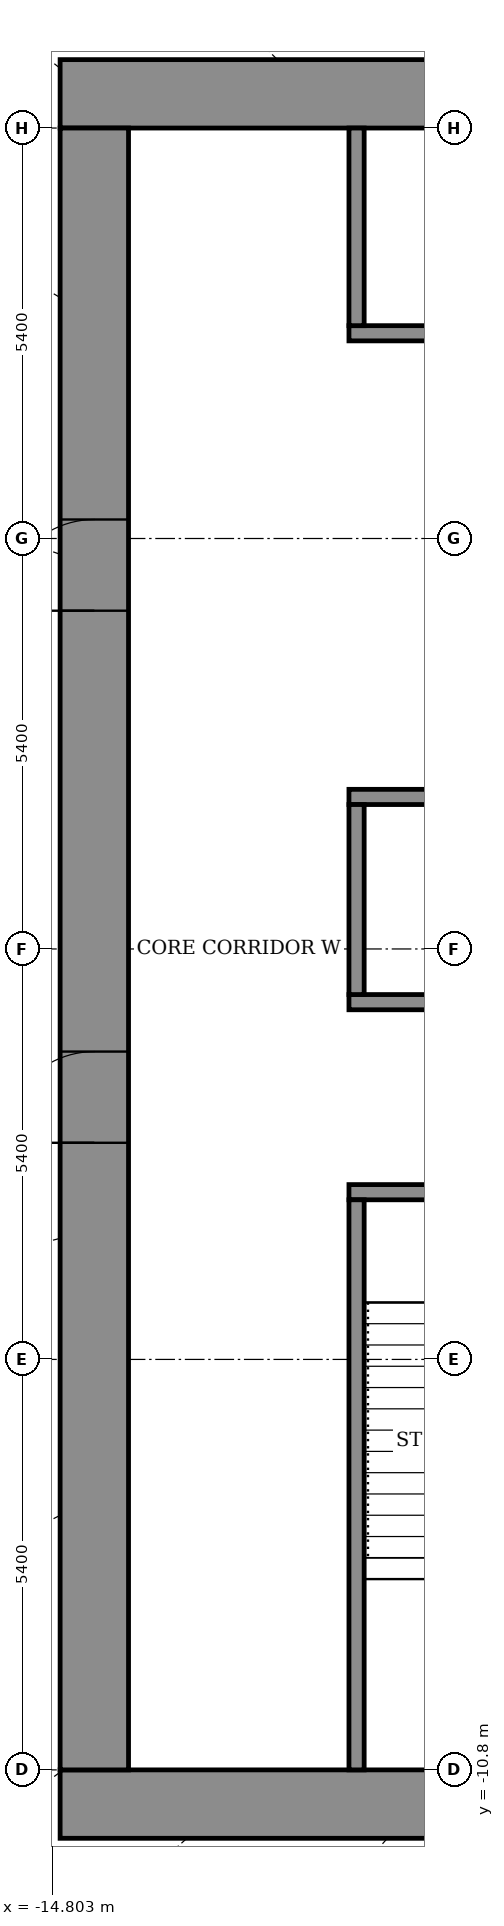
"""IFC4 building model, lengths in metres.
Left out: names, types, materials, properties, quantities, classifications, styles, units other than length and angle.
Written with IfcOpenShell. Run it as: python <this file> out.ifc"""

import sys

from ifc_helpers import new_model, si_unit, direction, frame, frame_2d, origin, place, context, subcontext, project, spatial, rectangle, extrude, element, fill, save


model = new_model("IFC4")
c1 = context("Model", 3, precision=1e-05, world=origin(), true_north=direction((0.0, 1.0)))
c2 = subcontext(c1, "Body", "Model", "MODEL_VIEW")
j1 = project(units=[si_unit("LENGTHUNIT", "METRE"), si_unit("PLANEANGLEUNIT", "RADIAN")], contexts=[c1])
p1 = place(None, origin())
s1 = spatial("IfcSite", under=j1, at=p1, CompositionType="ELEMENT")
p2 = place(p1, origin())
s2 = spatial("IfcBuilding", under=s1, at=p2, CompositionType="ELEMENT")
p3 = place(p2, frame((0.0, 0.0, 170.7)))
s3 = spatial("IfcBuildingStorey", under=s2, at=p3, CompositionType="ELEMENT", Elevation=170.7)
for number, where, z_axis, x_axis in (
    (1, (-14.7, -11.25, 0.0), (0.0, 0.0, 1.0), (1.0, 0.0, 0.0)),
    (2, (-14.7, 11.25, 0.0), (0.0, 0.0, 1.0), (1.0, 0.0, 0.0)),
):
    element("IfcWall", number, at=place(p3, frame(where, z_axis=z_axis, x_axis=x_axis)), inside=s3, PredefinedType="SHEAR", context=c2, shape_type="SweptSolid", body=[
        extrude(rectangle(XDim=29.4, YDim=0.9, at=frame_2d((14.7, 0.0))), origin(), (0.0, 0.0, 1.0), 4.6),
    ])
p4 = place(p3, frame((-14.25, -10.8, 0.0), z_axis=(0.0, 0.0, 1.0), x_axis=(0.0, 1.0, 0.0)))
e3 = element("IfcWall", 3, at=p4, inside=s3, PredefinedType="SHEAR", context=c2, shape_type="SweptSolid", body=[
    extrude(rectangle(XDim=21.6, YDim=0.9, at=frame_2d((10.8, 0.0))), origin(), (0.0, 0.0, 1.0), 4.6),
])
p5 = place(p4, frame((8.25, 0.0, 0.0)))
e4 = element("IfcOpeningElement", 4, at=p5, cuts=e3, PredefinedType="OPENING", context=c2, shape_type="SweptSolid", body=[
    extrude(rectangle(XDim=1.2, YDim=2.1, at=frame_2d((0.6, 1.05))), frame((0.0, 0.46, 0.0), z_axis=(0.0, -1.0, 0.0), x_axis=(1.0, 0.0, 0.0)), (0.0, 0.0, 1.0), 0.92),
])
p6 = place(p4, frame((15.25, 0.0, 0.0)))
e5 = element("IfcOpeningElement", 5, at=p6, cuts=e3, PredefinedType="OPENING", context=c2, shape_type="SweptSolid", body=[
    extrude(rectangle(XDim=1.2, YDim=2.1, at=frame_2d((0.6, 1.05))), frame((0.0, 0.46, 0.0), z_axis=(0.0, -1.0, 0.0), x_axis=(1.0, 0.0, 0.0)), (0.0, 0.0, 1.0), 0.92),
])
p7 = place(p3, frame((-10.9, -3.2, 0.0), z_axis=(0.0, 0.0, 1.0), x_axis=(1.0, 0.0, 0.0)))
e6 = element("IfcWall", 6, at=p7, inside=s3, PredefinedType="SHEAR", context=c2, shape_type="SweptSolid", body=[
    extrude(rectangle(XDim=21.8, YDim=0.2, at=frame_2d((10.9, 0.0))), origin(), (0.0, 0.0, 1.0), 4.05),
])
p8 = place(p7, frame((1.075, 0.0, 0.0)))
e7 = element("IfcOpeningElement", 7, at=p8, cuts=e6, PredefinedType="OPENING", context=c2, shape_type="SweptSolid", body=[
    extrude(rectangle(XDim=1.1, YDim=2.1, at=frame_2d((0.55, 1.05))), frame((0.0, 0.11, 0.0), z_axis=(0.0, -1.0, 0.0), x_axis=(1.0, 0.0, 0.0)), (0.0, 0.0, 1.0), 0.22),
])
p9 = place(p7, frame((10.325, 0.0, 0.0)))
e8 = element("IfcOpeningElement", 8, at=p9, cuts=e6, PredefinedType="OPENING", context=c2, shape_type="SweptSolid", body=[
    extrude(rectangle(XDim=1.1, YDim=2.1, at=frame_2d((0.55, 1.05))), frame((0.0, 0.11, 0.0), z_axis=(0.0, -1.0, 0.0), x_axis=(1.0, 0.0, 0.0)), (0.0, 0.0, 1.0), 0.22),
])
p10 = place(p7, frame((19.625, 0.0, 0.0)))
e9 = element("IfcOpeningElement", 9, at=p10, cuts=e6, PredefinedType="OPENING", context=c2, shape_type="SweptSolid", body=[
    extrude(rectangle(XDim=1.1, YDim=2.1, at=frame_2d((0.55, 1.05))), frame((0.0, 0.11, 0.0), z_axis=(0.0, -1.0, 0.0), x_axis=(1.0, 0.0, 0.0)), (0.0, 0.0, 1.0), 0.22),
])
p11 = place(p7, frame((5.7, 0.0, 0.0)))
e10 = element("IfcOpeningElement", 10, at=p11, cuts=e6, PredefinedType="OPENING", context=c2, shape_type="SweptSolid", body=[
    extrude(rectangle(XDim=1.1, YDim=2.1, at=frame_2d((0.55, 1.05))), frame((0.0, 0.11, 0.0), z_axis=(0.0, -1.0, 0.0), x_axis=(1.0, 0.0, 0.0)), (0.0, 0.0, 1.0), 0.22),
])
p12 = place(p7, frame((14.975, 0.0, 0.0)))
e11 = element("IfcOpeningElement", 11, at=p12, cuts=e6, PredefinedType="OPENING", context=c2, shape_type="SweptSolid", body=[
    extrude(rectangle(XDim=1.1, YDim=2.1, at=frame_2d((0.55, 1.05))), frame((0.0, 0.11, 0.0), z_axis=(0.0, -1.0, 0.0), x_axis=(1.0, 0.0, 0.0)), (0.0, 0.0, 1.0), 0.22),
])
p13 = place(p3, frame((-10.9, -0.7, 0.0), z_axis=(0.0, 0.0, 1.0), x_axis=(1.0, 0.0, 0.0)))
e12 = element("IfcWall", 12, at=p13, inside=s3, PredefinedType="SHEAR", context=c2, shape_type="SweptSolid", body=[
    extrude(rectangle(XDim=21.8, YDim=0.2, at=frame_2d((10.9, 0.0))), origin(), (0.0, 0.0, 1.0), 4.05),
])
p14 = place(p3, frame((-10.9, 2.0, 0.0), z_axis=(0.0, 0.0, 1.0), x_axis=(1.0, 0.0, 0.0)))
e13 = element("IfcWall", 13, at=p14, inside=s3, PredefinedType="SHEAR", context=c2, shape_type="SweptSolid", body=[
    extrude(rectangle(XDim=21.8, YDim=0.2, at=frame_2d((10.9, 0.0))), origin(), (0.0, 0.0, 1.0), 4.05),
])
p15 = place(p14, frame((14.4, 0.0, 0.0)))
e14 = element("IfcOpeningElement", 14, at=p15, cuts=e13, PredefinedType="OPENING", context=c2, shape_type="SweptSolid", body=[
    extrude(rectangle(XDim=1.1, YDim=2.1, at=frame_2d((0.55, 1.05))), frame((0.0, 0.11, 0.0), z_axis=(0.0, -1.0, 0.0), x_axis=(1.0, 0.0, 0.0)), (0.0, 0.0, 1.0), 0.22),
])
p16 = place(p14, frame((17.1, 0.0, 0.0)))
e15 = element("IfcOpeningElement", 15, at=p16, cuts=e13, PredefinedType="OPENING", context=c2, shape_type="SweptSolid", body=[
    extrude(rectangle(XDim=1.1, YDim=2.1, at=frame_2d((0.55, 1.05))), frame((0.0, 0.11, 0.0), z_axis=(0.0, -1.0, 0.0), x_axis=(1.0, 0.0, 0.0)), (0.0, 0.0, 1.0), 0.22),
])
p17 = place(p14, frame((19.8, 0.0, 0.0)))
e16 = element("IfcOpeningElement", 16, at=p17, cuts=e13, PredefinedType="OPENING", context=c2, shape_type="SweptSolid", body=[
    extrude(rectangle(XDim=1.1, YDim=2.1, at=frame_2d((0.55, 1.05))), frame((0.0, 0.11, 0.0), z_axis=(0.0, -1.0, 0.0), x_axis=(1.0, 0.0, 0.0)), (0.0, 0.0, 1.0), 0.22),
])
p18 = place(p14, frame((1.675, 0.0, 0.0)))
e17 = element("IfcOpeningElement", 17, at=p18, cuts=e13, PredefinedType="OPENING", context=c2, shape_type="SweptSolid", body=[
    extrude(rectangle(XDim=0.9, YDim=2.1, at=frame_2d((0.45, 1.05))), frame((0.0, 0.11, 0.0), z_axis=(0.0, -1.0, 0.0), x_axis=(1.0, 0.0, 0.0)), (0.0, 0.0, 1.0), 0.22),
])
p19 = place(p14, frame((8.425, 0.0, 0.0)))
e18 = element("IfcOpeningElement", 18, at=p19, cuts=e13, PredefinedType="OPENING", context=c2, shape_type="SweptSolid", body=[
    extrude(rectangle(XDim=0.9, YDim=2.1, at=frame_2d((0.45, 1.05))), frame((0.0, 0.11, 0.0), z_axis=(0.0, -1.0, 0.0), x_axis=(1.0, 0.0, 0.0)), (0.0, 0.0, 1.0), 0.22),
])
p20 = place(p3, frame((-10.9, 8.1, 0.0), z_axis=(0.0, 0.0, 1.0), x_axis=(1.0, 0.0, 0.0)))
e19 = element("IfcWall", 19, at=p20, inside=s3, PredefinedType="SHEAR", context=c2, shape_type="SweptSolid", body=[
    extrude(rectangle(XDim=21.8, YDim=0.2, at=frame_2d((10.9, 0.0))), origin(), (0.0, 0.0, 1.0), 4.05),
])
p21 = place(p20, frame((14.4, 0.0, 0.0)))
e20 = element("IfcOpeningElement", 20, at=p21, cuts=e19, PredefinedType="OPENING", context=c2, shape_type="SweptSolid", body=[
    extrude(rectangle(XDim=1.1, YDim=2.1, at=frame_2d((0.55, 1.05))), frame((0.0, 0.11, 0.0), z_axis=(0.0, -1.0, 0.0), x_axis=(1.0, 0.0, 0.0)), (0.0, 0.0, 1.0), 0.22),
])
p22 = place(p20, frame((17.1, 0.0, 0.0)))
e21 = element("IfcOpeningElement", 21, at=p22, cuts=e19, PredefinedType="OPENING", context=c2, shape_type="SweptSolid", body=[
    extrude(rectangle(XDim=1.1, YDim=2.1, at=frame_2d((0.55, 1.05))), frame((0.0, 0.11, 0.0), z_axis=(0.0, -1.0, 0.0), x_axis=(1.0, 0.0, 0.0)), (0.0, 0.0, 1.0), 0.22),
])
p23 = place(p20, frame((19.8, 0.0, 0.0)))
e22 = element("IfcOpeningElement", 22, at=p23, cuts=e19, PredefinedType="OPENING", context=c2, shape_type="SweptSolid", body=[
    extrude(rectangle(XDim=1.1, YDim=2.1, at=frame_2d((0.55, 1.05))), frame((0.0, 0.11, 0.0), z_axis=(0.0, -1.0, 0.0), x_axis=(1.0, 0.0, 0.0)), (0.0, 0.0, 1.0), 0.22),
])
p24 = place(p20, frame((1.675, 0.0, 0.0)))
e23 = element("IfcOpeningElement", 23, at=p24, cuts=e19, PredefinedType="OPENING", context=c2, shape_type="SweptSolid", body=[
    extrude(rectangle(XDim=0.9, YDim=2.1, at=frame_2d((0.45, 1.05))), frame((0.0, 0.11, 0.0), z_axis=(0.0, -1.0, 0.0), x_axis=(1.0, 0.0, 0.0)), (0.0, 0.0, 1.0), 0.22),
])
p25 = place(p20, frame((8.425, 0.0, 0.0)))
e24 = element("IfcOpeningElement", 24, at=p25, cuts=e19, PredefinedType="OPENING", context=c2, shape_type="SweptSolid", body=[
    extrude(rectangle(XDim=0.9, YDim=2.1, at=frame_2d((0.45, 1.05))), frame((0.0, 0.11, 0.0), z_axis=(0.0, -1.0, 0.0), x_axis=(1.0, 0.0, 0.0)), (0.0, 0.0, 1.0), 0.22),
])
p26 = place(p3, frame((-10.8, -10.8, 0.0), z_axis=(0.0, 0.0, 1.0), x_axis=(0.0, 1.0, 0.0)))
e25 = element("IfcWall", 25, at=p26, inside=s3, PredefinedType="SHEAR", context=c2, shape_type="SweptSolid", body=[
    extrude(rectangle(XDim=7.5, YDim=0.2, at=frame_2d((3.75, 0.0))), origin(), (0.0, 0.0, 1.0), 4.05),
])
p27 = place(p3, frame((-10.8, -0.6, 0.0), z_axis=(0.0, 0.0, 1.0), x_axis=(0.0, 1.0, 0.0)))
e26 = element("IfcWall", 26, at=p27, inside=s3, PredefinedType="STANDARD", context=c2, shape_type="SweptSolid", body=[
    extrude(rectangle(XDim=2.5, YDim=0.2, at=frame_2d((1.25, 0.0))), origin(), (0.0, 0.0, 1.0), 4.05),
])
p28 = place(p3, frame((-10.8, 8.2, 0.0), z_axis=(0.0, 0.0, 1.0), x_axis=(0.0, 1.0, 0.0)))
e27 = element("IfcWall", 27, at=p28, inside=s3, PredefinedType="STANDARD", context=c2, shape_type="SweptSolid", body=[
    extrude(rectangle(XDim=2.6, YDim=0.2, at=frame_2d((1.3, 0.0))), origin(), (0.0, 0.0, 1.0), 4.05),
])
p29 = place(p5, origin())
e28 = element("IfcDoor", 28, at=p29, inside=s3, OperationType="DOUBLE_DOOR_SINGLE_SWING", PredefinedType="DOOR", context=c2, shape_type="SweptSolid", body=[
    extrude(rectangle(XDim=1.2, YDim=2.1, at=frame_2d((0.6, 1.05))), frame((0.0, 0.025, 0.0), z_axis=(0.0, -1.0, 0.0), x_axis=(1.0, 0.0, 0.0)), (0.0, 0.0, 1.0), 0.05),
])
fill(e4, e28)
p30 = place(p6, origin())
e29 = element("IfcDoor", 29, at=p30, inside=s3, OperationType="DOUBLE_DOOR_SINGLE_SWING", PredefinedType="DOOR", context=c2, shape_type="SweptSolid", body=[
    extrude(rectangle(XDim=1.2, YDim=2.1, at=frame_2d((0.6, 1.05))), frame((0.0, 0.025, 0.0), z_axis=(0.0, -1.0, 0.0), x_axis=(1.0, 0.0, 0.0)), (0.0, 0.0, 1.0), 0.05),
])
fill(e5, e29)
save(model, sys.argv[1])
